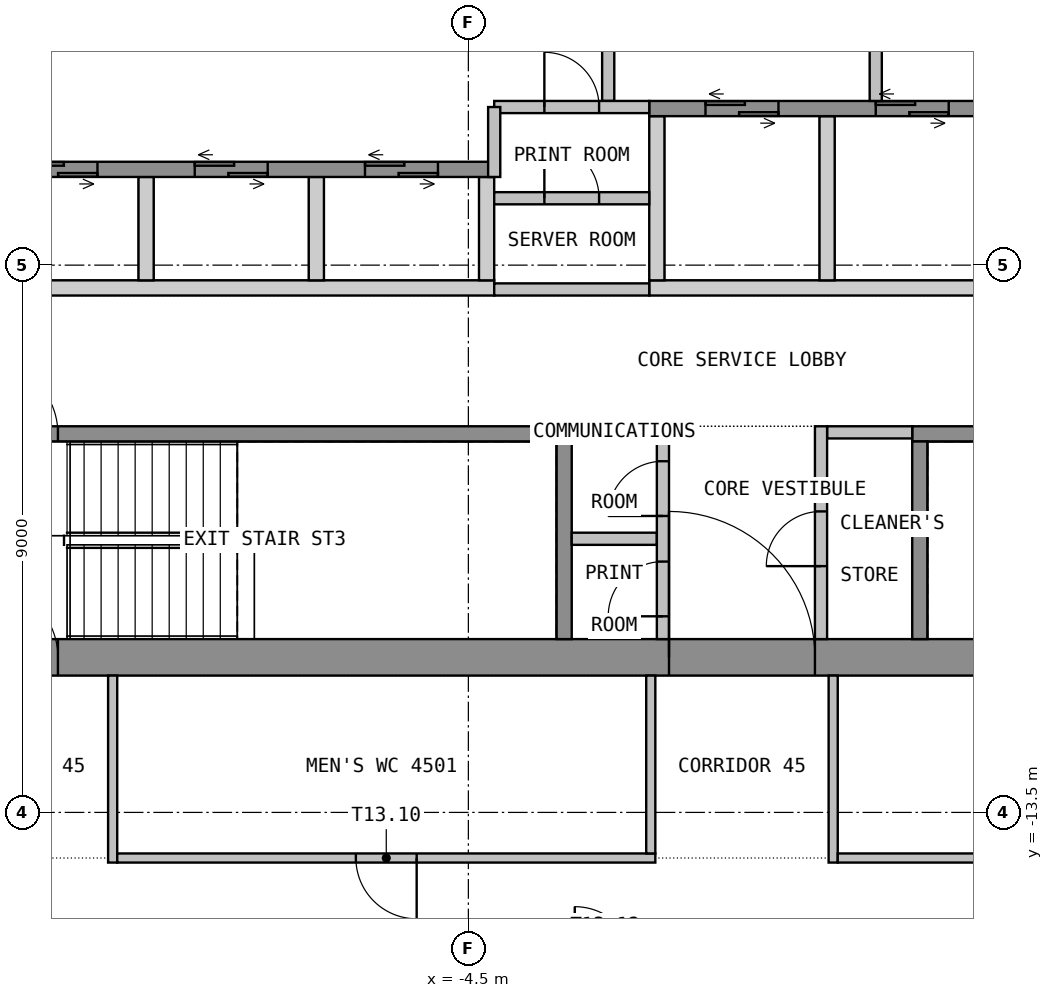
"""IFC4 building model, lengths in metres.
Left out: names, types, materials, properties, quantities, classifications, styles, units other than length and angle.
Written with IfcOpenShell. Run it as: python <this file> out.ifc"""

import sys

from ifc_helpers import new_model, si_unit, direction, frame, frame_2d, origin, place, context, subcontext, project, spatial, polyline, rectangle, outline, extrude, element, fill, save


model = new_model("IFC4")
c1 = context("Model", 3, precision=1e-05, world=origin(), true_north=direction((0.0, 1.0)))
c2 = subcontext(c1, "Body", "Model", "MODEL_VIEW")
j1 = project(units=[si_unit("LENGTHUNIT", "METRE"), si_unit("PLANEANGLEUNIT", "RADIAN")], contexts=[c1])
p1 = place(None, origin())
s1 = spatial("IfcSite", under=j1, at=p1, CompositionType="ELEMENT")
p2 = place(p1, origin())
s2 = spatial("IfcBuilding", under=s1, at=p2, CompositionType="ELEMENT")
p3 = place(p2, frame((0.0, 0.0, 183.9)))
s3 = spatial("IfcBuildingStorey", under=s2, at=p3, CompositionType="ELEMENT", Elevation=183.9)
p4 = place(p3, frame((-13.5, -10.95, 0.0), z_axis=(0.0, 0.0, 1.0), x_axis=(1.0, 0.0, 0.0)))
e1 = element("IfcWall", 1, at=p4, inside=s3, PredefinedType="SHEAR", context=c2, shape_type="SweptSolid", body=[
    extrude(rectangle(XDim=27.0, YDim=0.6, at=frame_2d((13.5, 0.0))), origin(), (0.0, 0.0, 1.0), 3.55),
])
p5 = place(p4, frame((12.3, 0.0, 0.0)))
e2 = element("IfcOpeningElement", 2, at=p5, cuts=e1, PredefinedType="OPENING", context=c2, shape_type="SweptSolid", body=[
    extrude(rectangle(XDim=2.4, YDim=2.1, at=frame_2d((1.2, 1.05))), frame((0.0, 0.31, 0.0), z_axis=(0.0, -1.0, 0.0), x_axis=(1.0, 0.0, 0.0)), (0.0, 0.0, 1.0), 0.62),
])
p6 = place(p4, frame((1.05, 0.0, 0.0)))
e3 = element("IfcOpeningElement", 3, at=p6, cuts=e1, PredefinedType="OPENING", context=c2, shape_type="SweptSolid", body=[
    extrude(rectangle(XDim=1.2, YDim=2.1, at=frame_2d((0.6, 1.05))), frame((0.0, 0.31, 0.0), z_axis=(0.0, -1.0, 0.0), x_axis=(1.0, 0.0, 0.0)), (0.0, 0.0, 1.0), 0.62),
])
p7 = place(p4, frame((24.75, 0.0, 0.0)))
e4 = element("IfcOpeningElement", 4, at=p7, cuts=e1, PredefinedType="OPENING", context=c2, shape_type="SweptSolid", body=[
    extrude(rectangle(XDim=1.2, YDim=2.1, at=frame_2d((0.6, 1.05))), frame((0.0, 0.31, 0.0), z_axis=(0.0, -1.0, 0.0), x_axis=(1.0, 0.0, 0.0)), (0.0, 0.0, 1.0), 0.62),
])
p8 = place(p3, origin())
e5 = element("IfcWall", 5, at=p8, inside=s3, PredefinedType="SHEAR", context=c2, shape_type="SweptSolid", body=[
    extrude(outline(polyline([(-12.9, -5.0), (-4.075, -5.0), (-4.075, -4.75), (-12.9, -4.75), (-12.9, -5.0)])), origin(), (0.0, 0.0, 1.0), 3.55),
])
p9 = place(p3, origin())
e6 = element("IfcWall", 6, at=p9, inside=s3, PredefinedType="SHEAR", context=c2, shape_type="SweptSolid", body=[
    extrude(outline(polyline([(-1.525, -5.0), (12.9, -5.0), (12.9, -4.75), (-1.525, -4.75), (-1.525, -5.0)])), origin(), (0.0, 0.0, 1.0), 3.55),
])
p10 = place(p3, origin())
e7 = element("IfcWall", 7, at=p10, inside=s3, PredefinedType="SHEAR", context=c2, shape_type="SweptSolid", body=[
    extrude(outline(polyline([(-9.925, -4.75), (-9.675, -4.75), (-9.675, -3.05), (-9.925, -3.05), (-9.925, -4.75)])), origin(), (0.0, 0.0, 1.0), 3.55),
])
p11 = place(p3, origin())
e8 = element("IfcWall", 8, at=p11, inside=s3, PredefinedType="SHEAR", context=c2, shape_type="SweptSolid", body=[
    extrude(outline(polyline([(-7.125, -4.75), (-6.875, -4.75), (-6.875, -3.05), (-7.125, -3.05), (-7.125, -4.75)])), origin(), (0.0, 0.0, 1.0), 3.55),
])
p12 = place(p3, origin())
e9 = element("IfcWall", 9, at=p12, inside=s3, PredefinedType="SHEAR", context=c2, shape_type="SweptSolid", body=[
    extrude(outline(polyline([(-4.325, -4.75), (-4.075, -4.75), (-4.075, -3.05), (-4.325, -3.05), (-4.325, -4.75)])), origin(), (0.0, 0.0, 1.0), 3.55),
])
p13 = place(p3, origin())
e10 = element("IfcWall", 10, at=p13, inside=s3, PredefinedType="SHEAR", context=c2, shape_type="SweptSolid", body=[
    extrude(outline(polyline([(-1.525, -4.75), (-1.275, -4.75), (-1.275, -2.05), (-1.525, -2.05), (-1.525, -4.75)])), origin(), (0.0, 0.0, 1.0), 3.55),
])
p14 = place(p3, origin())
e11 = element("IfcWall", 11, at=p14, inside=s3, PredefinedType="SHEAR", context=c2, shape_type="SweptSolid", body=[
    extrude(outline(polyline([(1.275, -4.75), (1.525, -4.75), (1.525, -2.05), (1.275, -2.05), (1.275, -4.75)])), origin(), (0.0, 0.0, 1.0), 3.55),
])
p15 = place(p3, frame((-12.9, -2.925, 0.0), z_axis=(0.0, 0.0, 1.0), x_axis=(1.0, 0.0, 0.0)))
e12 = element("IfcWall", 12, at=p15, inside=s3, PredefinedType="SHEAR", context=c2, shape_type="SweptSolid", body=[
    extrude(rectangle(XDim=8.825, YDim=0.25, at=frame_2d((4.413, 0.0))), origin(), (0.0, 0.0, 1.0), 3.55),
])
p16 = place(p15, frame((1.1, 0.0, 0.0)))
e13 = element("IfcOpeningElement", 13, at=p16, cuts=e12, PredefinedType="OPENING", context=c2, shape_type="SweptSolid", body=[
    extrude(rectangle(XDim=1.2, YDim=2.1, at=frame_2d((0.6, 1.05))), frame((0.0, 0.135, 0.0), z_axis=(0.0, -1.0, 0.0), x_axis=(1.0, 0.0, 0.0)), (0.0, 0.0, 1.0), 0.27),
])
p17 = place(p15, frame((3.9, 0.0, 0.0)))
e14 = element("IfcOpeningElement", 14, at=p17, cuts=e12, PredefinedType="OPENING", context=c2, shape_type="SweptSolid", body=[
    extrude(rectangle(XDim=1.2, YDim=2.1, at=frame_2d((0.6, 1.05))), frame((0.0, 0.135, 0.0), z_axis=(0.0, -1.0, 0.0), x_axis=(1.0, 0.0, 0.0)), (0.0, 0.0, 1.0), 0.27),
])
p18 = place(p15, frame((6.7, 0.0, 0.0)))
e15 = element("IfcOpeningElement", 15, at=p18, cuts=e12, PredefinedType="OPENING", context=c2, shape_type="SweptSolid", body=[
    extrude(rectangle(XDim=1.2, YDim=2.1, at=frame_2d((0.6, 1.05))), frame((0.0, 0.135, 0.0), z_axis=(0.0, -1.0, 0.0), x_axis=(1.0, 0.0, 0.0)), (0.0, 0.0, 1.0), 0.27),
])
p19 = place(p3, frame((-1.525, -1.925, 0.0), z_axis=(0.0, 0.0, 1.0), x_axis=(1.0, 0.0, 0.0)))
e16 = element("IfcWall", 16, at=p19, inside=s3, PredefinedType="SHEAR", context=c2, shape_type="SweptSolid", body=[
    extrude(rectangle(XDim=14.425, YDim=0.25, at=frame_2d((7.212, 0.0))), origin(), (0.0, 0.0, 1.0), 3.55),
])
p20 = place(p19, frame((0.925, 0.0, 0.0)))
e17 = element("IfcOpeningElement", 17, at=p20, cuts=e16, PredefinedType="OPENING", context=c2, shape_type="SweptSolid", body=[
    extrude(rectangle(XDim=1.2, YDim=2.1, at=frame_2d((0.6, 1.05))), frame((0.0, 0.135, 0.0), z_axis=(0.0, -1.0, 0.0), x_axis=(1.0, 0.0, 0.0)), (0.0, 0.0, 1.0), 0.27),
])
p21 = place(p19, frame((3.725, 0.0, 0.0)))
e18 = element("IfcOpeningElement", 18, at=p21, cuts=e16, PredefinedType="OPENING", context=c2, shape_type="SweptSolid", body=[
    extrude(rectangle(XDim=1.2, YDim=2.1, at=frame_2d((0.6, 1.05))), frame((0.0, 0.135, 0.0), z_axis=(0.0, -1.0, 0.0), x_axis=(1.0, 0.0, 0.0)), (0.0, 0.0, 1.0), 0.27),
])
p22 = place(p3, frame((-2.2, -1.8, 0.0), z_axis=(0.0, 0.0, 1.0), x_axis=(0.0, 1.0, 0.0)))
e19 = element("IfcWall", 19, at=p22, inside=s3, PredefinedType="PARTITIONING", context=c2, shape_type="SweptSolid", body=[
    extrude(rectangle(XDim=3.6, YDim=0.2, at=frame_2d((1.8, 0.0))), origin(), (0.0, 0.0, 1.0), 3.55),
])
p23 = place(p22, frame((1.2, 0.0, 0.0)))
e20 = element("IfcOpeningElement", 20, at=p23, cuts=e19, PredefinedType="OPENING", context=c2, shape_type="SweptSolid", body=[
    extrude(rectangle(XDim=1.2, YDim=2.1, at=frame_2d((0.6, 1.05))), frame((0.0, 0.11, 0.0), z_axis=(0.0, -1.0, 0.0), x_axis=(1.0, 0.0, 0.0)), (0.0, 0.0, 1.0), 0.22),
])
p24 = place(p3, frame((2.2, -1.8, 0.0), z_axis=(0.0, 0.0, 1.0), x_axis=(0.0, 1.0, 0.0)))
e21 = element("IfcWall", 21, at=p24, inside=s3, PredefinedType="PARTITIONING", context=c2, shape_type="SweptSolid", body=[
    extrude(rectangle(XDim=3.6, YDim=0.2, at=frame_2d((1.8, 0.0))), origin(), (0.0, 0.0, 1.0), 3.55),
])
p25 = place(p24, frame((1.2, 0.0, 0.0)))
e22 = element("IfcOpeningElement", 22, at=p25, cuts=e21, PredefinedType="OPENING", context=c2, shape_type="SweptSolid", body=[
    extrude(rectangle(XDim=1.2, YDim=2.1, at=frame_2d((0.6, 1.05))), frame((0.0, 0.11, 0.0), z_axis=(0.0, -1.0, 0.0), x_axis=(1.0, 0.0, 0.0)), (0.0, 0.0, 1.0), 0.22),
])
p26 = place(p3, frame((-12.9, -7.275, 0.0), z_axis=(0.0, 0.0, 1.0), x_axis=(1.0, 0.0, 0.0)))
e23 = element("IfcWall", 23, at=p26, inside=s3, PredefinedType="SHEAR", context=c2, shape_type="SweptSolid", body=[
    extrude(rectangle(XDim=10.1, YDim=0.25, at=frame_2d((5.05, 0.0))), origin(), (0.0, 0.0, 1.0), 3.55),
])
p27 = place(p26, frame((0.45, 0.0, 0.0)))
e24 = element("IfcOpeningElement", 24, at=p27, cuts=e23, PredefinedType="OPENING", context=c2, shape_type="SweptSolid", body=[
    extrude(rectangle(XDim=1.2, YDim=2.1, at=frame_2d((0.6, 1.05))), frame((0.0, 0.135, 0.0), z_axis=(0.0, -1.0, 0.0), x_axis=(1.0, 0.0, 0.0)), (0.0, 0.0, 1.0), 0.27),
])
p28 = place(p3, frame((-2.925, -10.65, 0.0), z_axis=(0.0, 0.0, 1.0), x_axis=(0.0, 1.0, 0.0)))
e25 = element("IfcWall", 25, at=p28, inside=s3, PredefinedType="SHEAR", context=c2, shape_type="SweptSolid", body=[
    extrude(rectangle(XDim=3.25, YDim=0.25, at=frame_2d((1.625, 0.0))), origin(), (0.0, 0.0, 1.0), 3.55),
])
p29 = place(p3, frame((2.8, -7.275, 0.0), z_axis=(0.0, 0.0, 1.0), x_axis=(1.0, 0.0, 0.0)))
e26 = element("IfcWall", 26, at=p29, inside=s3, PredefinedType="SHEAR", context=c2, shape_type="SweptSolid", body=[
    extrude(rectangle(XDim=10.1, YDim=0.25, at=frame_2d((5.05, 0.0))), origin(), (0.0, 0.0, 1.0), 3.55),
])
p30 = place(p29, frame((8.45, 0.0, 0.0)))
e27 = element("IfcOpeningElement", 27, at=p30, cuts=e26, PredefinedType="OPENING", context=c2, shape_type="SweptSolid", body=[
    extrude(rectangle(XDim=1.2, YDim=2.1, at=frame_2d((0.6, 1.05))), frame((0.0, 0.135, 0.0), z_axis=(0.0, -1.0, 0.0), x_axis=(1.0, 0.0, 0.0)), (0.0, 0.0, 1.0), 0.27),
])
p31 = place(p3, frame((2.925, -10.65, 0.0), z_axis=(0.0, 0.0, 1.0), x_axis=(0.0, 1.0, 0.0)))
e28 = element("IfcWall", 28, at=p31, inside=s3, PredefinedType="SHEAR", context=c2, shape_type="SweptSolid", body=[
    extrude(rectangle(XDim=3.25, YDim=0.25, at=frame_2d((1.625, 0.0))), origin(), (0.0, 0.0, 1.0), 3.55),
])
for number, where, z_axis, x_axis in (
    (29, (-2.8, -7.25, 0.0), (0.0, 0.0, 1.0), (1.0, 0.0, 0.0)),
    (30, (-2.8, -9.0, 0.0), (0.0, 0.0, 1.0), (1.0, 0.0, 0.0)),
    (31, (1.4, -7.25, 0.0), (0.0, 0.0, 1.0), (1.0, 0.0, 0.0)),
):
    element("IfcWall", number, at=place(p3, frame(where, z_axis=z_axis, x_axis=x_axis)), inside=s3, PredefinedType="PARTITIONING", context=c2, shape_type="SweptSolid", body=[
        extrude(rectangle(XDim=1.4, YDim=0.2, at=frame_2d((0.7, 0.0))), origin(), (0.0, 0.0, 1.0), 3.55),
    ])
p32 = place(p3, frame((-1.3, -10.65, 0.0), z_axis=(0.0, 0.0, 1.0), x_axis=(0.0, 1.0, 0.0)))
e32 = element("IfcWall", 32, at=p32, inside=s3, PredefinedType="PARTITIONING", context=c2, shape_type="SweptSolid", body=[
    extrude(rectangle(XDim=3.5, YDim=0.2, at=frame_2d((1.75, 0.0))), origin(), (0.0, 0.0, 1.0), 3.55),
])
p33 = place(p32, frame((0.375, 0.0, 0.0)))
e33 = element("IfcOpeningElement", 33, at=p33, cuts=e32, PredefinedType="OPENING", context=c2, shape_type="SweptSolid", body=[
    extrude(rectangle(XDim=0.9, YDim=2.1, at=frame_2d((0.45, 1.05))), frame((0.0, 0.11, 0.0), z_axis=(0.0, -1.0, 0.0), x_axis=(1.0, 0.0, 0.0)), (0.0, 0.0, 1.0), 0.22),
])
p34 = place(p32, frame((2.025, 0.0, 0.0)))
e34 = element("IfcOpeningElement", 34, at=p34, cuts=e32, PredefinedType="OPENING", context=c2, shape_type="SweptSolid", body=[
    extrude(rectangle(XDim=0.9, YDim=2.1, at=frame_2d((0.45, 1.05))), frame((0.0, 0.11, 0.0), z_axis=(0.0, -1.0, 0.0), x_axis=(1.0, 0.0, 0.0)), (0.0, 0.0, 1.0), 0.22),
])
p35 = place(p3, frame((1.3, -10.65, 0.0), z_axis=(0.0, 0.0, 1.0), x_axis=(0.0, 1.0, 0.0)))
e35 = element("IfcWall", 35, at=p35, inside=s3, PredefinedType="PARTITIONING", context=c2, shape_type="SweptSolid", body=[
    extrude(rectangle(XDim=3.5, YDim=0.2, at=frame_2d((1.75, 0.0))), origin(), (0.0, 0.0, 1.0), 3.55),
])
p36 = place(p35, frame((1.2, 0.0, 0.0)))
e36 = element("IfcOpeningElement", 36, at=p36, cuts=e35, PredefinedType="OPENING", context=c2, shape_type="SweptSolid", body=[
    extrude(rectangle(XDim=0.9, YDim=2.1, at=frame_2d((0.45, 1.05))), frame((0.0, 0.11, 0.0), z_axis=(0.0, -1.0, 0.0), x_axis=(1.0, 0.0, 0.0)), (0.0, 0.0, 1.0), 0.22),
])
p37 = place(p3, frame((-4.075, -3.4, 0.0), z_axis=(0.0, 0.0, 1.0), x_axis=(1.0, 0.0, 0.0)))
e37 = element("IfcWall", 37, at=p37, inside=s3, PredefinedType="PARTITIONING", context=c2, shape_type="SweptSolid", body=[
    extrude(rectangle(XDim=2.55, YDim=0.2, at=frame_2d((1.275, 0.0))), origin(), (0.0, 0.0, 1.0), 3.55),
])
p38 = place(p37, frame((0.825, 0.0, 0.0)))
e38 = element("IfcOpeningElement", 38, at=p38, cuts=e37, PredefinedType="OPENING", context=c2, shape_type="SweptSolid", body=[
    extrude(rectangle(XDim=0.9, YDim=2.1, at=frame_2d((0.45, 1.05))), frame((0.0, 0.11, 0.0), z_axis=(0.0, -1.0, 0.0), x_axis=(1.0, 0.0, 0.0)), (0.0, 0.0, 1.0), 0.22),
])
p39 = place(p3, frame((-4.075, -1.9, 0.0), z_axis=(0.0, 0.0, 1.0), x_axis=(1.0, 0.0, 0.0)))
e39 = element("IfcWall", 39, at=p39, inside=s3, PredefinedType="PARTITIONING", context=c2, shape_type="SweptSolid", body=[
    extrude(rectangle(XDim=2.55, YDim=0.2, at=frame_2d((1.275, 0.0))), origin(), (0.0, 0.0, 1.0), 3.55),
])
p40 = place(p39, frame((0.825, 0.0, 0.0)))
e40 = element("IfcOpeningElement", 40, at=p40, cuts=e39, PredefinedType="OPENING", context=c2, shape_type="SweptSolid", body=[
    extrude(rectangle(XDim=0.9, YDim=2.1, at=frame_2d((0.45, 1.05))), frame((0.0, 0.11, 0.0), z_axis=(0.0, -1.0, 0.0), x_axis=(1.0, 0.0, 0.0)), (0.0, 0.0, 1.0), 0.22),
])
p41 = place(p3, frame((-4.075, -4.9, 0.0), z_axis=(0.0, 0.0, 1.0), x_axis=(1.0, 0.0, 0.0)))
e41 = element("IfcWall", 41, at=p41, inside=s3, PredefinedType="PARTITIONING", context=c2, shape_type="SweptSolid", body=[
    extrude(rectangle(XDim=2.55, YDim=0.2, at=frame_2d((1.275, 0.0))), origin(), (0.0, 0.0, 1.0), 3.55),
])
p42 = place(p3, frame((-4.075, -1.9, 0.0), z_axis=(0.0, 0.0, 1.0), x_axis=(0.0, -1.0, 0.0)))
e42 = element("IfcWall", 42, at=p42, inside=s3, PredefinedType="PARTITIONING", context=c2, shape_type="SweptSolid", body=[
    extrude(rectangle(XDim=1.15, YDim=0.2, at=frame_2d((0.575, 0.0))), origin(), (0.0, 0.0, 1.0), 3.55),
])
p43 = place(p3, frame((-10.35, -14.325, 0.0), z_axis=(0.0, 0.0, 1.0), x_axis=(0.0, 1.0, 0.0)))
e43 = element("IfcWall", 43, at=p43, inside=s3, PredefinedType="PARTITIONING", context=c2, shape_type="SweptSolid", body=[
    extrude(rectangle(XDim=3.075, YDim=0.15, at=frame_2d((1.538, 0.0))), origin(), (0.0, 0.0, 1.0), 3.55),
])
p44 = place(p3, frame((-1.425, -14.25, 0.0), z_axis=(0.0, 0.0, 1.0), x_axis=(-1.0, 0.0, 0.0)))
e44 = element("IfcWall", 44, at=p44, inside=s3, PredefinedType="PARTITIONING", context=c2, shape_type="SweptSolid", body=[
    extrude(rectangle(XDim=8.85, YDim=0.15, at=frame_2d((4.425, 0.0))), origin(), (0.0, 0.0, 1.0), 3.55),
])
p45 = place(p44, frame((3.925, 0.0, 0.0)))
e45 = element("IfcOpeningElement", 45, at=p45, cuts=e44, PredefinedType="OPENING", context=c2, shape_type="SweptSolid", body=[
    extrude(rectangle(XDim=1.0, YDim=2.1, at=frame_2d((0.5, 1.05))), frame((0.0, 0.085, 0.0), z_axis=(0.0, -1.0, 0.0), x_axis=(1.0, 0.0, 0.0)), (0.0, 0.0, 1.0), 0.17),
])
p46 = place(p3, frame((-1.5, -11.25, 0.0), z_axis=(0.0, 0.0, 1.0), x_axis=(0.0, -1.0, 0.0)))
e46 = element("IfcWall", 46, at=p46, inside=s3, PredefinedType="PARTITIONING", context=c2, shape_type="SweptSolid", body=[
    extrude(rectangle(XDim=2.925, YDim=0.15, at=frame_2d((1.462, 0.0))), origin(), (0.0, 0.0, 1.0), 3.55),
])
p47 = place(p3, frame((1.5, -14.325, 0.0), z_axis=(0.0, 0.0, 1.0), x_axis=(0.0, 1.0, 0.0)))
e47 = element("IfcWall", 47, at=p47, inside=s3, PredefinedType="PARTITIONING", context=c2, shape_type="SweptSolid", body=[
    extrude(rectangle(XDim=3.075, YDim=0.15, at=frame_2d((1.538, 0.0))), origin(), (0.0, 0.0, 1.0), 3.55),
])
p48 = place(p3, frame((10.425, -14.25, 0.0), z_axis=(0.0, 0.0, 1.0), x_axis=(-1.0, 0.0, 0.0)))
e48 = element("IfcWall", 48, at=p48, inside=s3, PredefinedType="PARTITIONING", context=c2, shape_type="SweptSolid", body=[
    extrude(rectangle(XDim=8.85, YDim=0.15, at=frame_2d((4.425, 0.0))), origin(), (0.0, 0.0, 1.0), 3.55),
])
p49 = place(p48, frame((3.925, 0.0, 0.0)))
e49 = element("IfcOpeningElement", 49, at=p49, cuts=e48, PredefinedType="OPENING", context=c2, shape_type="SweptSolid", body=[
    extrude(rectangle(XDim=1.0, YDim=2.1, at=frame_2d((0.5, 1.05))), frame((0.0, 0.085, 0.0), z_axis=(0.0, -1.0, 0.0), x_axis=(1.0, 0.0, 0.0)), (0.0, 0.0, 1.0), 0.17),
])
p50 = place(p5, origin())
e50 = element("IfcDoor", 50, at=p50, inside=s3, OperationType="DOUBLE_DOOR_DOUBLE_SWING", PredefinedType="DOOR", context=c2, shape_type="SweptSolid", body=[
    extrude(rectangle(XDim=2.4, YDim=2.1, at=frame_2d((1.2, 1.05))), frame((0.0, 0.025, 0.0), z_axis=(0.0, -1.0, 0.0), x_axis=(1.0, 0.0, 0.0)), (0.0, 0.0, 1.0), 0.05),
])
fill(e2, e50)
p51 = place(p6, origin())
e51 = element("IfcDoor", 51, at=p51, inside=s3, OperationType="SINGLE_SWING_RIGHT", PredefinedType="DOOR", context=c2, shape_type="SweptSolid", body=[
    extrude(rectangle(XDim=1.2, YDim=2.1, at=frame_2d((0.6, 1.05))), frame((0.0, 0.025, 0.0), z_axis=(0.0, -1.0, 0.0), x_axis=(1.0, 0.0, 0.0)), (0.0, 0.0, 1.0), 0.05),
])
fill(e3, e51)
p52 = place(p16, origin())
e52 = element("IfcDoor", 52, at=p52, inside=s3, OperationType="DOUBLE_DOOR_SLIDING", PredefinedType="DOOR", context=c2, shape_type="SweptSolid", body=[
    extrude(rectangle(XDim=1.2, YDim=2.1, at=frame_2d((0.6, 1.05))), frame((0.0, 0.025, 0.0), z_axis=(0.0, -1.0, 0.0), x_axis=(1.0, 0.0, 0.0)), (0.0, 0.0, 1.0), 0.05),
])
fill(e13, e52)
p53 = place(p17, origin())
e53 = element("IfcDoor", 53, at=p53, inside=s3, OperationType="DOUBLE_DOOR_SLIDING", PredefinedType="DOOR", context=c2, shape_type="SweptSolid", body=[
    extrude(rectangle(XDim=1.2, YDim=2.1, at=frame_2d((0.6, 1.05))), frame((0.0, 0.025, 0.0), z_axis=(0.0, -1.0, 0.0), x_axis=(1.0, 0.0, 0.0)), (0.0, 0.0, 1.0), 0.05),
])
fill(e14, e53)
p54 = place(p18, origin())
e54 = element("IfcDoor", 54, at=p54, inside=s3, OperationType="DOUBLE_DOOR_SLIDING", PredefinedType="DOOR", context=c2, shape_type="SweptSolid", body=[
    extrude(rectangle(XDim=1.2, YDim=2.1, at=frame_2d((0.6, 1.05))), frame((0.0, 0.025, 0.0), z_axis=(0.0, -1.0, 0.0), x_axis=(1.0, 0.0, 0.0)), (0.0, 0.0, 1.0), 0.05),
])
fill(e15, e54)
p55 = place(p20, origin())
e55 = element("IfcDoor", 55, at=p55, inside=s3, OperationType="DOUBLE_DOOR_SLIDING", PredefinedType="DOOR", context=c2, shape_type="SweptSolid", body=[
    extrude(rectangle(XDim=1.2, YDim=2.1, at=frame_2d((0.6, 1.05))), frame((0.0, 0.025, 0.0), z_axis=(0.0, -1.0, 0.0), x_axis=(1.0, 0.0, 0.0)), (0.0, 0.0, 1.0), 0.05),
])
fill(e17, e55)
p56 = place(p21, origin())
e56 = element("IfcDoor", 56, at=p56, inside=s3, OperationType="DOUBLE_DOOR_SLIDING", PredefinedType="DOOR", context=c2, shape_type="SweptSolid", body=[
    extrude(rectangle(XDim=1.2, YDim=2.1, at=frame_2d((0.6, 1.05))), frame((0.0, 0.025, 0.0), z_axis=(0.0, -1.0, 0.0), x_axis=(1.0, 0.0, 0.0)), (0.0, 0.0, 1.0), 0.05),
])
fill(e18, e56)
p57 = place(p27, origin())
e57 = element("IfcDoor", 57, at=p57, inside=s3, OperationType="SINGLE_SWING_LEFT", PredefinedType="DOOR", context=c2, shape_type="SweptSolid", body=[
    extrude(rectangle(XDim=1.2, YDim=2.1, at=frame_2d((0.6, 1.05))), frame((0.0, 0.025, 0.0), z_axis=(0.0, -1.0, 0.0), x_axis=(1.0, 0.0, 0.0)), (0.0, 0.0, 1.0), 0.05),
])
fill(e24, e57)
p58 = place(p33, origin())
e58 = element("IfcDoor", 58, at=p58, inside=s3, OperationType="SINGLE_SWING_LEFT", PredefinedType="DOOR", context=c2, shape_type="SweptSolid", body=[
    extrude(rectangle(XDim=0.9, YDim=2.1, at=frame_2d((0.45, 1.05))), frame((0.0, 0.025, 0.0), z_axis=(0.0, -1.0, 0.0), x_axis=(1.0, 0.0, 0.0)), (0.0, 0.0, 1.0), 0.05),
])
fill(e33, e58)
p59 = place(p34, origin())
e59 = element("IfcDoor", 59, at=p59, inside=s3, OperationType="SINGLE_SWING_LEFT", PredefinedType="DOOR", context=c2, shape_type="SweptSolid", body=[
    extrude(rectangle(XDim=0.9, YDim=2.1, at=frame_2d((0.45, 1.05))), frame((0.0, 0.025, 0.0), z_axis=(0.0, -1.0, 0.0), x_axis=(1.0, 0.0, 0.0)), (0.0, 0.0, 1.0), 0.05),
])
fill(e34, e59)
p60 = place(p36, origin())
e60 = element("IfcDoor", 60, at=p60, inside=s3, OperationType="SINGLE_SWING_LEFT", PredefinedType="DOOR", context=c2, shape_type="SweptSolid", body=[
    extrude(rectangle(XDim=0.9, YDim=2.1, at=frame_2d((0.45, 1.05))), frame((0.0, 0.025, 0.0), z_axis=(0.0, -1.0, 0.0), x_axis=(1.0, 0.0, 0.0)), (0.0, 0.0, 1.0), 0.05),
])
fill(e36, e60)
p61 = place(p38, origin())
e61 = element("IfcDoor", 61, at=p61, inside=s3, OperationType="SINGLE_SWING_LEFT", PredefinedType="DOOR", context=c2, shape_type="SweptSolid", body=[
    extrude(rectangle(XDim=0.9, YDim=2.1, at=frame_2d((0.45, 1.05))), frame((0.0, 0.025, 0.0), z_axis=(0.0, -1.0, 0.0), x_axis=(1.0, 0.0, 0.0)), (0.0, 0.0, 1.0), 0.05),
])
fill(e38, e61)
p62 = place(p40, origin())
e62 = element("IfcDoor", 62, at=p62, inside=s3, OperationType="SINGLE_SWING_LEFT", PredefinedType="DOOR", context=c2, shape_type="SweptSolid", body=[
    extrude(rectangle(XDim=0.9, YDim=2.1, at=frame_2d((0.45, 1.05))), frame((0.0, 0.025, 0.0), z_axis=(0.0, -1.0, 0.0), x_axis=(1.0, 0.0, 0.0)), (0.0, 0.0, 1.0), 0.05),
])
fill(e40, e62)
p63 = place(p45, origin())
e63 = element("IfcDoor", 63, at=p63, inside=s3, OperationType="SINGLE_SWING_RIGHT", PredefinedType="DOOR", context=c2, shape_type="SweptSolid", body=[
    extrude(rectangle(XDim=1.0, YDim=2.1, at=frame_2d((0.5, 1.05))), frame((0.0, 0.025, 0.0), z_axis=(0.0, -1.0, 0.0), x_axis=(1.0, 0.0, 0.0)), (0.0, 0.0, 1.0), 0.05),
])
fill(e45, e63)
save(model, sys.argv[1])
